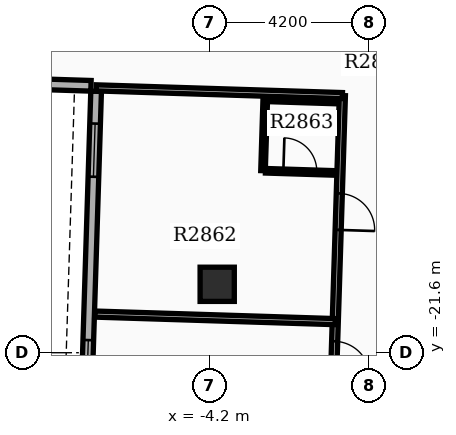
"""IFC4 building model, lengths in metres.
Left out: names, types, materials, properties, quantities, classifications, styles, units other than length and angle.
Written with IfcOpenShell. Run it as: python <this file> out.ifc"""

import sys

from ifc_helpers import new_model, si_unit, direction, frame, frame_2d, origin, origin_2d, place, context, subcontext, project, spatial, rectangle, extrude, element, fill, save


model = new_model("IFC4")
c1 = context("Model", 3, precision=1e-05, world=origin(), true_north=direction((0.0, 1.0)))
c2 = subcontext(c1, "Body", "Model", "MODEL_VIEW")
j1 = project(units=[si_unit("LENGTHUNIT", "METRE"), si_unit("PLANEANGLEUNIT", "RADIAN")], contexts=[c1])
p1 = place(None, origin())
s1 = spatial("IfcSite", under=j1, at=p1, CompositionType="ELEMENT")
p2 = place(p1, origin())
s2 = spatial("IfcBuilding", under=s1, at=p2, CompositionType="ELEMENT")
p3 = place(p2, frame((0.0, 0.0, 176.1)))
s3 = spatial("IfcBuildingStorey", under=s2, at=p3, CompositionType="ELEMENT", Elevation=176.1)
p4 = place(p3, frame((-4.0, -19.8, 0.0), z_axis=(0.0, 0.0, 1.0), x_axis=(1.0, 0.0, 0.0)))
e1 = element("IfcColumn", 1, at=p4, inside=s3, PredefinedType="COLUMN", context=c2, shape_type="SweptSolid", body=[
    extrude(rectangle(XDim=0.9, YDim=0.9, at=origin_2d()), origin(), (0.0, 0.0, 1.0), 3.9),
])
p5 = place(p3, frame((-7.186, -14.721, 0.0), z_axis=(0.0, 0.0, 1.0), x_axis=(-0.031410322165, -0.999506574096, 0.0)))
e2 = element("IfcWall", 2, at=p5, inside=s3, PredefinedType="STANDARD", context=c2, shape_type="SweptSolid", body=[
    extrude(rectangle(XDim=20.1, YDim=0.28, at=frame_2d((10.05, 0.0))), origin(), (0.0, 0.0, 1.0), 2.97),
])
p6 = place(p5, frame((0.85, 0.0, 0.8)))
e3 = element("IfcOpeningElement", 3, at=p6, cuts=e2, PredefinedType="OPENING", context=c2, shape_type="SweptSolid", body=[
    extrude(rectangle(XDim=1.4, YDim=1.6, at=frame_2d((0.7, 0.8))), frame((0.0, 0.15, 0.0), z_axis=(0.0, -1.0, 0.0), x_axis=(1.0, 0.0, 0.0)), (0.0, 0.0, 1.0), 0.3),
])
p7 = place(p5, frame((6.55, 0.0, 0.8)))
e4 = element("IfcOpeningElement", 4, at=p7, cuts=e2, PredefinedType="OPENING", context=c2, shape_type="SweptSolid", body=[
    extrude(rectangle(XDim=1.4, YDim=1.6, at=frame_2d((0.7, 0.8))), frame((0.0, 0.15, 0.0), z_axis=(0.0, -1.0, 0.0), x_axis=(1.0, 0.0, 0.0)), (0.0, 0.0, 1.0), 0.3),
])
p8 = place(p5, frame((10.25, 0.0, 0.8)))
e5 = element("IfcOpeningElement", 5, at=p8, cuts=e2, PredefinedType="OPENING", context=c2, shape_type="SweptSolid", body=[
    extrude(rectangle(XDim=1.4, YDim=1.6, at=frame_2d((0.7, 0.8))), frame((0.0, 0.15, 0.0), z_axis=(0.0, -1.0, 0.0), x_axis=(1.0, 0.0, 0.0)), (0.0, 0.0, 1.0), 0.3),
])
p9 = place(p5, frame((13.45, 0.0, 0.8)))
e6 = element("IfcOpeningElement", 6, at=p9, cuts=e2, PredefinedType="OPENING", context=c2, shape_type="SweptSolid", body=[
    extrude(rectangle(XDim=1.4, YDim=1.6, at=frame_2d((0.7, 0.8))), frame((0.0, 0.15, 0.0), z_axis=(0.0, -1.0, 0.0), x_axis=(1.0, 0.0, 0.0)), (0.0, 0.0, 1.0), 0.3),
])
p10 = place(p3, frame((-13.618, -14.379, 0.0), z_axis=(0.0, 0.0, 1.0), x_axis=(0.999507224741, -0.031389611199, 0.0)))
e7 = element("IfcWall", 7, at=p10, inside=s3, PredefinedType="STANDARD", context=c2, shape_type="SweptSolid", body=[
    extrude(rectangle(XDim=6.3, YDim=0.28, at=frame_2d((3.15, 0.0))), origin(), (0.0, 0.0, 1.0), 2.97),
])
p11 = place(p3, frame((-0.706, -14.835, 0.0), z_axis=(0.0, 0.0, 1.0), x_axis=(-0.031411552371, -0.999506535435, 0.0)))
e8 = element("IfcWall", 8, at=p11, inside=s3, PredefinedType="PARTITIONING", context=c2, shape_type="SweptSolid", body=[
    extrude(rectangle(XDim=9.7, YDim=0.16, at=frame_2d((4.85, 0.0))), origin(), (0.0, 0.0, 1.0), 2.96),
])
p12 = place(p11, frame((2.575, 0.0, 0.0)))
e9 = element("IfcOpeningElement", 9, at=p12, cuts=e8, PredefinedType="OPENING", context=c2, shape_type="SweptSolid", body=[
    extrude(rectangle(XDim=0.96, YDim=2.15, at=frame_2d((0.48, 1.075))), frame((0.0, 0.09, 0.0), z_axis=(0.0, -1.0, 0.0), x_axis=(1.0, 0.0, 0.0)), (0.0, 0.0, 1.0), 0.18),
])
p13 = place(p11, frame((6.467, 0.0, 0.0)))
e10 = element("IfcOpeningElement", 10, at=p13, cuts=e8, PredefinedType="OPENING", context=c2, shape_type="SweptSolid", body=[
    extrude(rectangle(XDim=0.96, YDim=2.15, at=frame_2d((0.48, 1.075))), frame((0.0, 0.09, 0.0), z_axis=(0.0, -1.0, 0.0), x_axis=(1.0, 0.0, 0.0)), (0.0, 0.0, 1.0), 0.18),
])
p14 = place(p3, frame((-0.706, -14.835, 0.0), z_axis=(0.0, 0.0, 1.0), x_axis=(-0.999506214218, 0.031421771746, 0.0)))
e11 = element("IfcWall", 11, at=p14, inside=s3, PredefinedType="PARTITIONING", context=c2, shape_type="SweptSolid", body=[
    extrude(rectangle(XDim=6.48, YDim=0.16, at=frame_2d((3.24, 0.0))), origin(), (0.0, 0.0, 1.0), 2.96),
])
p15 = place(p3, frame((-0.893, -20.782, 0.0), z_axis=(0.0, 0.0, 1.0), x_axis=(-0.999506152458, 0.031423736229, 0.0)))
e12 = element("IfcWall", 12, at=p15, inside=s3, PredefinedType="PARTITIONING", context=c2, shape_type="SweptSolid", body=[
    extrude(rectangle(XDim=6.332, YDim=0.16, at=frame_2d((3.166, 0.0))), origin(), (0.0, 0.0, 1.0), 2.96),
])
p16 = place(p3, frame((-2.729, -16.812, 0.0), z_axis=(0.0, 0.0, 1.0), x_axis=(0.999507221803, -0.031389704724, 0.0)))
e13 = element("IfcWall", 13, at=p16, inside=s3, PredefinedType="PARTITIONING", context=c2, shape_type="SweptSolid", body=[
    extrude(rectangle(XDim=1.82, YDim=0.12, at=frame_2d((0.91, 0.0))), origin(), (0.0, 0.0, 1.0), 2.96),
])
p17 = place(p16, frame((0.47, 0.0, 0.0)))
e14 = element("IfcOpeningElement", 14, at=p17, cuts=e13, PredefinedType="OPENING", context=c2, shape_type="SweptSolid", body=[
    extrude(rectangle(XDim=0.88, YDim=2.1, at=frame_2d((0.44, 1.05))), frame((0.0, 0.07, 0.0), z_axis=(0.0, -1.0, 0.0), x_axis=(1.0, 0.0, 0.0)), (0.0, 0.0, 1.0), 0.14),
])
p18 = place(p3, frame((-2.67, -14.934, 0.0), z_axis=(0.0, 0.0, 1.0), x_axis=(0.999507221803, -0.031389704724, 0.0)))
e15 = element("IfcWall", 15, at=p18, inside=s3, PredefinedType="PARTITIONING", context=c2, shape_type="SweptSolid", body=[
    extrude(rectangle(XDim=1.82, YDim=0.12, at=frame_2d((0.91, 0.0))), origin(), (0.0, 0.0, 1.0), 2.96),
])
p19 = place(p3, frame((-2.735, -14.931, 0.0), z_axis=(0.0, 0.0, 1.0), x_axis=(-0.031425292588, -0.999506103526, 0.0)))
e16 = element("IfcWall", 16, at=p19, inside=s3, PredefinedType="PARTITIONING", context=c2, shape_type="SweptSolid", body=[
    extrude(rectangle(XDim=1.88, YDim=0.12, at=frame_2d((0.94, 0.0))), origin(), (0.0, 0.0, 1.0), 2.96),
])
p20 = place(p6, origin())
e17 = element("IfcWindow", 17, at=p20, inside=s3, PartitioningType="SINGLE_PANEL", PredefinedType="WINDOW", context=c2, shape_type="SweptSolid", body=[
    extrude(rectangle(XDim=1.4, YDim=1.6, at=frame_2d((0.7, 0.8))), frame((0.0, 0.03, 0.0), z_axis=(0.0, -1.0, 0.0), x_axis=(1.0, 0.0, 0.0)), (0.0, 0.0, 1.0), 0.06),
])
fill(e3, e17)
p21 = place(p7, origin())
e18 = element("IfcWindow", 18, at=p21, inside=s3, PartitioningType="SINGLE_PANEL", PredefinedType="WINDOW", context=c2, shape_type="SweptSolid", body=[
    extrude(rectangle(XDim=1.4, YDim=1.6, at=frame_2d((0.7, 0.8))), frame((0.0, 0.03, 0.0), z_axis=(0.0, -1.0, 0.0), x_axis=(1.0, 0.0, 0.0)), (0.0, 0.0, 1.0), 0.06),
])
fill(e4, e18)
p22 = place(p12, origin())
e19 = element("IfcDoor", 19, at=p22, inside=s3, OperationType="SINGLE_SWING_RIGHT", PredefinedType="DOOR", context=c2, shape_type="SweptSolid", body=[
    extrude(rectangle(XDim=0.96, YDim=2.15, at=frame_2d((0.48, 1.075))), frame((0.0, 0.025, 0.0), z_axis=(0.0, -1.0, 0.0), x_axis=(1.0, 0.0, 0.0)), (0.0, 0.0, 1.0), 0.05),
])
fill(e9, e19)
p23 = place(p17, origin())
e20 = element("IfcDoor", 20, at=p23, inside=s3, OperationType="SINGLE_SWING_LEFT", PredefinedType="DOOR", context=c2, shape_type="SweptSolid", body=[
    extrude(rectangle(XDim=0.88, YDim=2.1, at=frame_2d((0.44, 1.05))), frame((0.0, 0.025, 0.0), z_axis=(0.0, -1.0, 0.0), x_axis=(1.0, 0.0, 0.0)), (0.0, 0.0, 1.0), 0.05),
])
fill(e14, e20)
p24 = place(p13, origin())
e21 = element("IfcDoor", 21, at=p24, inside=s3, OperationType="SINGLE_SWING_RIGHT", PredefinedType="DOOR", context=c2, shape_type="SweptSolid", body=[
    extrude(rectangle(XDim=0.96, YDim=2.15, at=frame_2d((0.48, 1.075))), frame((0.0, 0.025, 0.0), z_axis=(0.0, -1.0, 0.0), x_axis=(1.0, 0.0, 0.0)), (0.0, 0.0, 1.0), 0.05),
])
fill(e10, e21)
save(model, sys.argv[1])
